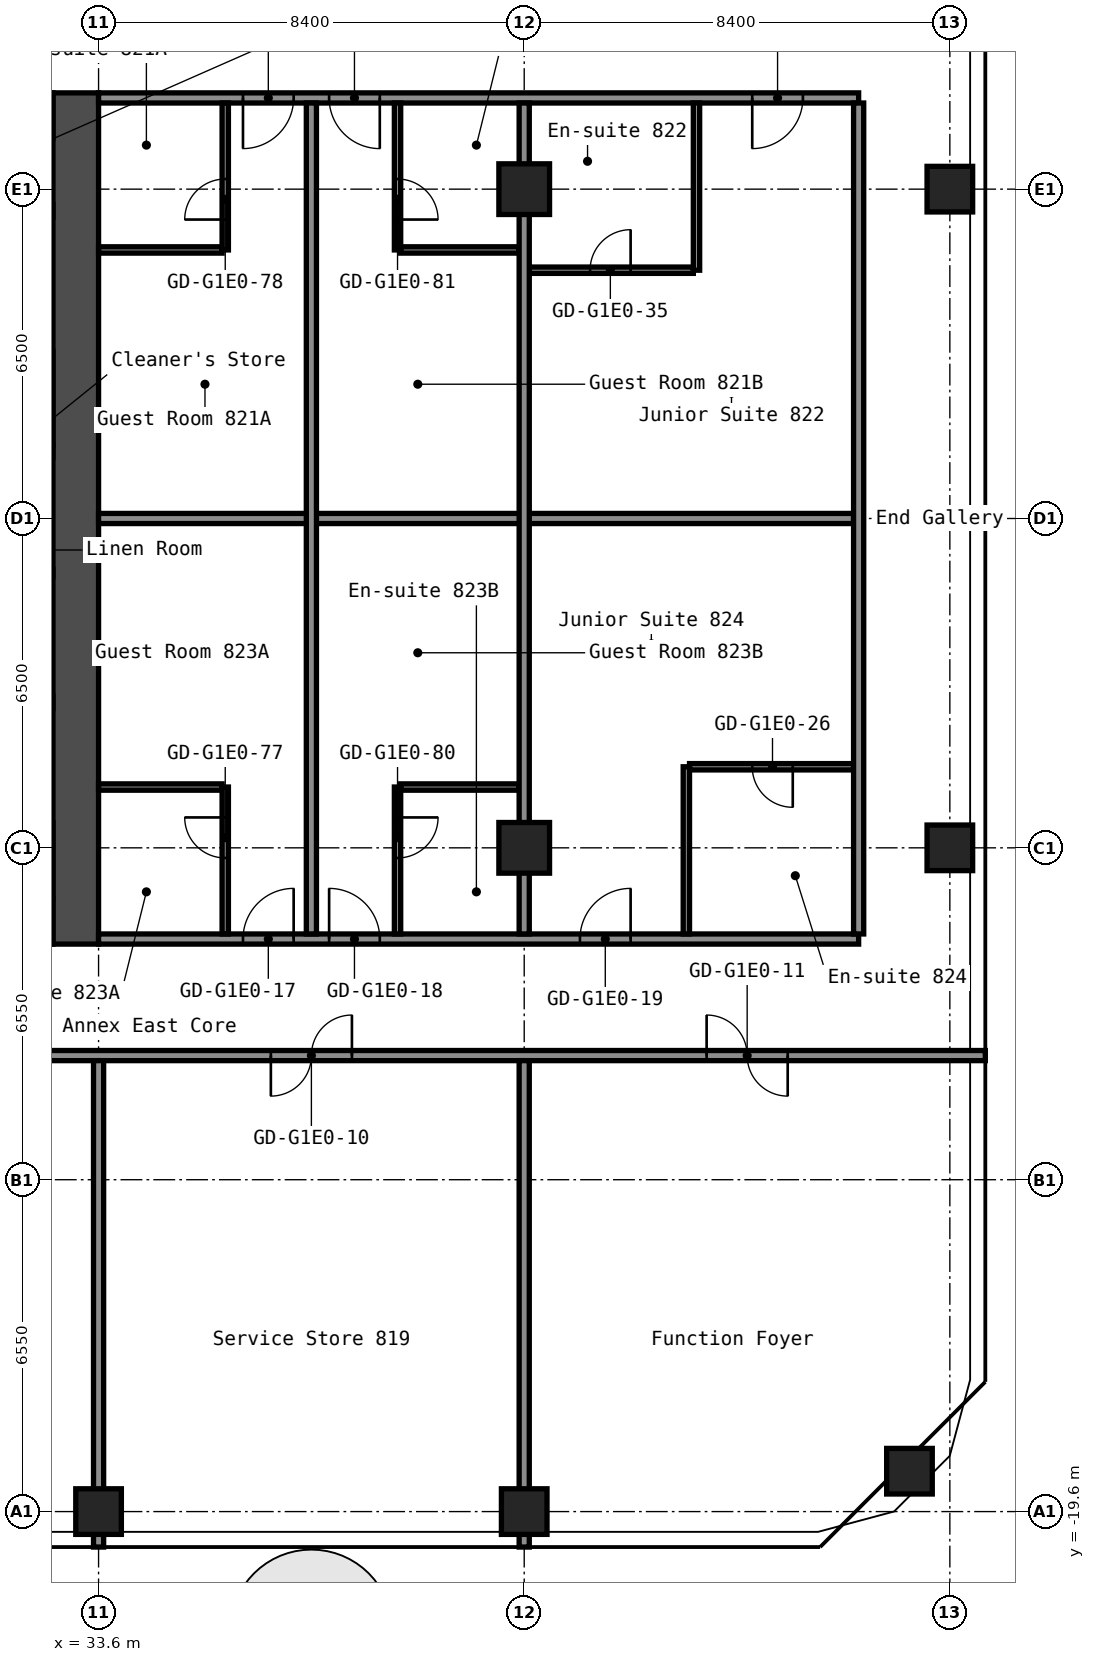
"""IFC4 building model, lengths in metres.
Left out: names, types, materials, properties, quantities, classifications, styles, units other than length and angle.
Written with IfcOpenShell. Run it as: python <this file> out.ifc"""

import sys

from ifc_helpers import new_model, si_unit, direction, frame, frame_2d, origin, origin_2d, place, context, subcontext, project, spatial, rectangle, hollow_rectangle, extrude, element, fill, save


model = new_model("IFC4")
c1 = context("Model", 3, precision=1e-05, world=origin(), true_north=direction((0.0, 1.0)))
c2 = subcontext(c1, "Body", "Model", "MODEL_VIEW")
j1 = project(units=[si_unit("LENGTHUNIT", "METRE"), si_unit("PLANEANGLEUNIT", "RADIAN")], contexts=[c1])
p1 = place(None, origin())
s1 = spatial("IfcSite", under=j1, at=p1, CompositionType="ELEMENT")
p2 = place(p1, origin())
s2 = spatial("IfcBuilding", under=s1, at=p2, CompositionType="ELEMENT")
p3 = place(p2, frame((0.0, 0.0, 32.6)))
s3 = spatial("IfcBuildingStorey", under=s2, at=p3, CompositionType="ELEMENT", Elevation=32.6)
for number, where, z_axis, x_axis in (
    (1, (33.6, -19.6, 0.0), (0.0, 0.0, 1.0), (1.0, 0.0, 0.0)),
    (2, (42.0, -19.6, 0.0), (0.0, 0.0, 1.0), (1.0, 0.0, 0.0)),
):
    element("IfcColumn", number, at=place(p3, frame(where, z_axis=z_axis, x_axis=x_axis)), inside=s3, PredefinedType="COLUMN", context=c2, shape_type="SweptSolid", body=[
        extrude(hollow_rectangle(XDim=0.9, YDim=0.9, WallThickness=0.036, at=origin_2d()), origin(), (0.0, 0.0, 1.0), 2.8),
    ])
for number, where, z_axis, x_axis in (
    (3, (42.0, -6.5, 0.0), (0.0, 0.0, 1.0), (1.0, 0.0, 0.0)),
    (4, (42.0, 6.5, 0.0), (0.0, 0.0, 1.0), (1.0, 0.0, 0.0)),
):
    element("IfcColumn", number, at=place(p3, frame(where, z_axis=z_axis, x_axis=x_axis)), inside=s3, PredefinedType="COLUMN", context=c2, shape_type="SweptSolid", body=[
        extrude(hollow_rectangle(XDim=1.0, YDim=1.0, WallThickness=0.04, at=origin_2d()), origin(), (0.0, 0.0, 1.0), 2.8),
    ])
for number, where, z_axis, x_axis in (
    (5, (49.603, -18.803, 0.0), (0.0, 0.0, 1.0), (1.0, 0.0, 0.0)),
    (6, (50.4, -6.5, 0.0), (0.0, 0.0, 1.0), (1.0, 0.0, 0.0)),
    (7, (50.4, 6.5, 0.0), (0.0, 0.0, 1.0), (1.0, 0.0, 0.0)),
):
    element("IfcColumn", number, at=place(p3, frame(where, z_axis=z_axis, x_axis=x_axis)), inside=s3, PredefinedType="COLUMN", context=c2, shape_type="SweptSolid", body=[
        extrude(hollow_rectangle(XDim=0.9, YDim=0.9, WallThickness=0.036, at=origin_2d()), origin(), (0.0, 0.0, 1.0), 2.8),
    ])
p4 = place(p3, frame((33.15, -8.4, 0.0), z_axis=(0.0, 0.0, 1.0), x_axis=(0.0, 1.0, 0.0)))
e8 = element("IfcWall", 8, at=p4, inside=s3, PredefinedType="SHEAR", context=c2, shape_type="SweptSolid", body=[
    extrude(rectangle(XDim=16.8, YDim=0.9, at=frame_2d((8.4, 0.0))), origin(), (0.0, 0.0, 1.0), 2.8),
])
p5 = place(p3, frame((16.8, -10.6, 0.0), z_axis=(0.0, 0.0, 1.0), x_axis=(1.0, 0.0, 0.0)))
e9 = element("IfcWall", 9, at=p5, inside=s3, PredefinedType="PARTITIONING", context=c2, shape_type="SweptSolid", body=[
    extrude(rectangle(XDim=34.3, YDim=0.2, at=frame_2d((17.15, 0.0))), origin(), (0.0, 0.0, 1.0), 2.8),
])
p6 = place(p5, frame((3.4, 0.0, 0.0)))
e10 = element("IfcOpeningElement", 10, at=p6, cuts=e9, PredefinedType="OPENING", context=c2, shape_type="SweptSolid", body=[
    extrude(rectangle(XDim=1.6, YDim=2.1, at=frame_2d((0.8, 1.05))), frame((0.0, 0.11, 0.0), z_axis=(0.0, -1.0, 0.0), x_axis=(1.0, 0.0, 0.0)), (0.0, 0.0, 1.0), 0.22),
])
p7 = place(p5, frame((11.8, 0.0, 0.0)))
e11 = element("IfcOpeningElement", 11, at=p7, cuts=e9, PredefinedType="OPENING", context=c2, shape_type="SweptSolid", body=[
    extrude(rectangle(XDim=1.6, YDim=2.1, at=frame_2d((0.8, 1.05))), frame((0.0, 0.11, 0.0), z_axis=(0.0, -1.0, 0.0), x_axis=(1.0, 0.0, 0.0)), (0.0, 0.0, 1.0), 0.22),
])
p8 = place(p5, frame((20.2, 0.0, 0.0)))
e12 = element("IfcOpeningElement", 12, at=p8, cuts=e9, PredefinedType="OPENING", context=c2, shape_type="SweptSolid", body=[
    extrude(rectangle(XDim=1.6, YDim=2.1, at=frame_2d((0.8, 1.05))), frame((0.0, 0.11, 0.0), z_axis=(0.0, -1.0, 0.0), x_axis=(1.0, 0.0, 0.0)), (0.0, 0.0, 1.0), 0.22),
])
p9 = place(p5, frame((28.8, 0.0, 0.0)))
e13 = element("IfcOpeningElement", 13, at=p9, cuts=e9, PredefinedType="OPENING", context=c2, shape_type="SweptSolid", body=[
    extrude(rectangle(XDim=1.6, YDim=2.1, at=frame_2d((0.8, 1.05))), frame((0.0, 0.11, 0.0), z_axis=(0.0, -1.0, 0.0), x_axis=(1.0, 0.0, 0.0)), (0.0, 0.0, 1.0), 0.22),
])
p10 = place(p3, frame((33.6, -8.3, 0.0), z_axis=(0.0, 0.0, 1.0), x_axis=(1.0, 0.0, 0.0)))
e14 = element("IfcWall", 14, at=p10, inside=s3, PredefinedType="PARTITIONING", context=c2, shape_type="SweptSolid", body=[
    extrude(rectangle(XDim=15.0, YDim=0.2, at=frame_2d((7.5, 0.0))), origin(), (0.0, 0.0, 1.0), 2.8),
])
p11 = place(p10, frame((2.85, 0.0, 0.0)))
e15 = element("IfcOpeningElement", 15, at=p11, cuts=e14, PredefinedType="OPENING", context=c2, shape_type="SweptSolid", body=[
    extrude(rectangle(XDim=1.0, YDim=2.1, at=frame_2d((0.5, 1.05))), frame((0.0, 0.11, 0.0), z_axis=(0.0, -1.0, 0.0), x_axis=(1.0, 0.0, 0.0)), (0.0, 0.0, 1.0), 0.22),
])
p12 = place(p10, frame((4.55, 0.0, 0.0)))
e16 = element("IfcOpeningElement", 16, at=p12, cuts=e14, PredefinedType="OPENING", context=c2, shape_type="SweptSolid", body=[
    extrude(rectangle(XDim=1.0, YDim=2.1, at=frame_2d((0.5, 1.05))), frame((0.0, 0.11, 0.0), z_axis=(0.0, -1.0, 0.0), x_axis=(1.0, 0.0, 0.0)), (0.0, 0.0, 1.0), 0.22),
])
p13 = place(p10, frame((9.5, 0.0, 0.0)))
e17 = element("IfcOpeningElement", 17, at=p13, cuts=e14, PredefinedType="OPENING", context=c2, shape_type="SweptSolid", body=[
    extrude(rectangle(XDim=1.0, YDim=2.1, at=frame_2d((0.5, 1.05))), frame((0.0, 0.11, 0.0), z_axis=(0.0, -1.0, 0.0), x_axis=(1.0, 0.0, 0.0)), (0.0, 0.0, 1.0), 0.22),
])
p14 = place(p3, frame((33.6, -5.3, 0.0), z_axis=(0.0, 0.0, 1.0), x_axis=(1.0, 0.0, 0.0)))
e18 = element("IfcWall", 18, at=p14, inside=s3, PredefinedType="PARTITIONING", context=c2, shape_type="SweptSolid", body=[
    extrude(rectangle(XDim=2.438, YDim=0.125, at=frame_2d((1.219, 0.0))), origin(), (0.0, 0.0, 1.0), 2.8),
])
p15 = place(p3, frame((39.562, -5.3, 0.0), z_axis=(0.0, 0.0, 1.0), x_axis=(1.0, 0.0, 0.0)))
e19 = element("IfcWall", 19, at=p15, inside=s3, PredefinedType="PARTITIONING", context=c2, shape_type="SweptSolid", body=[
    extrude(rectangle(XDim=2.337, YDim=0.125, at=frame_2d((1.169, 0.0))), origin(), (0.0, 0.0, 1.0), 2.8),
])
p16 = place(p3, frame((45.262, -4.9, 0.0), z_axis=(0.0, 0.0, 1.0), x_axis=(1.0, 0.0, 0.0)))
e20 = element("IfcWall", 20, at=p16, inside=s3, PredefinedType="PARTITIONING", context=c2, shape_type="SweptSolid", body=[
    extrude(rectangle(XDim=3.238, YDim=0.125, at=frame_2d((1.619, 0.0))), origin(), (0.0, 0.0, 1.0), 2.8),
])
p17 = place(p16, frame((1.238, 0.0, 0.0)))
e21 = element("IfcOpeningElement", 21, at=p17, cuts=e20, PredefinedType="OPENING", context=c2, shape_type="SweptSolid", body=[
    extrude(rectangle(XDim=0.8, YDim=2.1, at=frame_2d((0.4, 1.05))), frame((0.0, 0.073, 0.0), z_axis=(0.0, -1.0, 0.0), x_axis=(1.0, 0.0, 0.0)), (0.0, 0.0, 1.0), 0.145),
])
p18 = place(p3, frame((33.6, 0.0, 0.0), z_axis=(0.0, 0.0, 1.0), x_axis=(1.0, 0.0, 0.0)))
e22 = element("IfcWall", 22, at=p18, inside=s3, PredefinedType="PARTITIONING", context=c2, shape_type="SweptSolid", body=[
    extrude(rectangle(XDim=14.9, YDim=0.2, at=frame_2d((7.45, 0.0))), origin(), (0.0, 0.0, 1.0), 2.8),
])
p19 = place(p3, frame((42.1, 4.9, 0.0), z_axis=(0.0, 0.0, 1.0), x_axis=(1.0, 0.0, 0.0)))
e23 = element("IfcWall", 23, at=p19, inside=s3, PredefinedType="PARTITIONING", context=c2, shape_type="SweptSolid", body=[
    extrude(rectangle(XDim=3.237, YDim=0.125, at=frame_2d((1.619, 0.0))), origin(), (0.0, 0.0, 1.0), 2.8),
])
p20 = place(p19, frame((1.2, 0.0, 0.0)))
e24 = element("IfcOpeningElement", 24, at=p20, cuts=e23, PredefinedType="OPENING", context=c2, shape_type="SweptSolid", body=[
    extrude(rectangle(XDim=0.8, YDim=2.1, at=frame_2d((0.4, 1.05))), frame((0.0, 0.073, 0.0), z_axis=(0.0, -1.0, 0.0), x_axis=(1.0, 0.0, 0.0)), (0.0, 0.0, 1.0), 0.145),
])
p21 = place(p3, frame((33.6, 5.3, 0.0), z_axis=(0.0, 0.0, 1.0), x_axis=(1.0, 0.0, 0.0)))
e25 = element("IfcWall", 25, at=p21, inside=s3, PredefinedType="PARTITIONING", context=c2, shape_type="SweptSolid", body=[
    extrude(rectangle(XDim=2.438, YDim=0.125, at=frame_2d((1.219, 0.0))), origin(), (0.0, 0.0, 1.0), 2.8),
])
p22 = place(p3, frame((39.562, 5.3, 0.0), z_axis=(0.0, 0.0, 1.0), x_axis=(1.0, 0.0, 0.0)))
e26 = element("IfcWall", 26, at=p22, inside=s3, PredefinedType="PARTITIONING", context=c2, shape_type="SweptSolid", body=[
    extrude(rectangle(XDim=2.337, YDim=0.125, at=frame_2d((1.169, 0.0))), origin(), (0.0, 0.0, 1.0), 2.8),
])
p23 = place(p3, frame((33.6, 8.3, 0.0), z_axis=(0.0, 0.0, 1.0), x_axis=(1.0, 0.0, 0.0)))
e27 = element("IfcWall", 27, at=p23, inside=s3, PredefinedType="PARTITIONING", context=c2, shape_type="SweptSolid", body=[
    extrude(rectangle(XDim=15.0, YDim=0.2, at=frame_2d((7.5, 0.0))), origin(), (0.0, 0.0, 1.0), 2.8),
])
p24 = place(p23, frame((2.85, 0.0, 0.0)))
e28 = element("IfcOpeningElement", 28, at=p24, cuts=e27, PredefinedType="OPENING", context=c2, shape_type="SweptSolid", body=[
    extrude(rectangle(XDim=1.0, YDim=2.1, at=frame_2d((0.5, 1.05))), frame((0.0, 0.11, 0.0), z_axis=(0.0, -1.0, 0.0), x_axis=(1.0, 0.0, 0.0)), (0.0, 0.0, 1.0), 0.22),
])
p25 = place(p23, frame((4.55, 0.0, 0.0)))
e29 = element("IfcOpeningElement", 29, at=p25, cuts=e27, PredefinedType="OPENING", context=c2, shape_type="SweptSolid", body=[
    extrude(rectangle(XDim=1.0, YDim=2.1, at=frame_2d((0.5, 1.05))), frame((0.0, 0.11, 0.0), z_axis=(0.0, -1.0, 0.0), x_axis=(1.0, 0.0, 0.0)), (0.0, 0.0, 1.0), 0.22),
])
p26 = place(p23, frame((12.9, 0.0, 0.0)))
e30 = element("IfcOpeningElement", 30, at=p26, cuts=e27, PredefinedType="OPENING", context=c2, shape_type="SweptSolid", body=[
    extrude(rectangle(XDim=1.0, YDim=2.1, at=frame_2d((0.5, 1.05))), frame((0.0, 0.11, 0.0), z_axis=(0.0, -1.0, 0.0), x_axis=(1.0, 0.0, 0.0)), (0.0, 0.0, 1.0), 0.22),
])
p27 = place(p3, frame((33.6, -20.3, 0.0), z_axis=(0.0, 0.0, 1.0), x_axis=(0.0, 1.0, 0.0)))
e31 = element("IfcWall", 31, at=p27, inside=s3, PredefinedType="PARTITIONING", context=c2, shape_type="SweptSolid", body=[
    extrude(rectangle(XDim=9.6, YDim=0.2, at=frame_2d((4.8, 0.0))), origin(), (0.0, 0.0, 1.0), 2.8),
])
p28 = place(p3, frame((36.1, -8.2, 0.0), z_axis=(0.0, 0.0, 1.0), x_axis=(0.0, 1.0, 0.0)))
e32 = element("IfcWall", 32, at=p28, inside=s3, PredefinedType="PARTITIONING", context=c2, shape_type="SweptSolid", body=[
    extrude(rectangle(XDim=2.9, YDim=0.125, at=frame_2d((1.45, 0.0))), origin(), (0.0, 0.0, 1.0), 2.8),
])
p29 = place(p28, frame((1.5, 0.0, 0.0)))
e33 = element("IfcOpeningElement", 33, at=p29, cuts=e32, PredefinedType="OPENING", context=c2, shape_type="SweptSolid", body=[
    extrude(rectangle(XDim=0.8, YDim=2.1, at=frame_2d((0.4, 1.05))), frame((0.0, 0.073, 0.0), z_axis=(0.0, -1.0, 0.0), x_axis=(1.0, 0.0, 0.0)), (0.0, 0.0, 1.0), 0.145),
])
p30 = place(p3, frame((36.1, 5.3, 0.0), z_axis=(0.0, 0.0, 1.0), x_axis=(0.0, 1.0, 0.0)))
e34 = element("IfcWall", 34, at=p30, inside=s3, PredefinedType="PARTITIONING", context=c2, shape_type="SweptSolid", body=[
    extrude(rectangle(XDim=2.9, YDim=0.125, at=frame_2d((1.45, 0.0))), origin(), (0.0, 0.0, 1.0), 2.8),
])
p31 = place(p30, frame((0.6, 0.0, 0.0)))
e35 = element("IfcOpeningElement", 35, at=p31, cuts=e34, PredefinedType="OPENING", context=c2, shape_type="SweptSolid", body=[
    extrude(rectangle(XDim=0.8, YDim=2.1, at=frame_2d((0.4, 1.05))), frame((0.0, 0.073, 0.0), z_axis=(0.0, -1.0, 0.0), x_axis=(1.0, 0.0, 0.0)), (0.0, 0.0, 1.0), 0.145),
])
p32 = place(p3, frame((37.8, -8.2, 0.0), z_axis=(0.0, 0.0, 1.0), x_axis=(0.0, 1.0, 0.0)))
e36 = element("IfcWall", 36, at=p32, inside=s3, PredefinedType="PARTITIONING", context=c2, shape_type="SweptSolid", body=[
    extrude(rectangle(XDim=16.4, YDim=0.2, at=frame_2d((8.2, 0.0))), origin(), (0.0, 0.0, 1.0), 2.8),
])
p33 = place(p3, frame((39.5, -8.2, 0.0), z_axis=(0.0, 0.0, 1.0), x_axis=(0.0, 1.0, 0.0)))
e37 = element("IfcWall", 37, at=p33, inside=s3, PredefinedType="PARTITIONING", context=c2, shape_type="SweptSolid", body=[
    extrude(rectangle(XDim=2.9, YDim=0.125, at=frame_2d((1.45, 0.0))), origin(), (0.0, 0.0, 1.0), 2.8),
])
p34 = place(p33, frame((1.5, 0.0, 0.0)))
e38 = element("IfcOpeningElement", 38, at=p34, cuts=e37, PredefinedType="OPENING", context=c2, shape_type="SweptSolid", body=[
    extrude(rectangle(XDim=0.8, YDim=2.1, at=frame_2d((0.4, 1.05))), frame((0.0, 0.073, 0.0), z_axis=(0.0, -1.0, 0.0), x_axis=(1.0, 0.0, 0.0)), (0.0, 0.0, 1.0), 0.145),
])
p35 = place(p3, frame((39.5, 5.3, 0.0), z_axis=(0.0, 0.0, 1.0), x_axis=(0.0, 1.0, 0.0)))
e39 = element("IfcWall", 39, at=p35, inside=s3, PredefinedType="PARTITIONING", context=c2, shape_type="SweptSolid", body=[
    extrude(rectangle(XDim=2.9, YDim=0.125, at=frame_2d((1.45, 0.0))), origin(), (0.0, 0.0, 1.0), 2.8),
])
p36 = place(p35, frame((0.6, 0.0, 0.0)))
e40 = element("IfcOpeningElement", 40, at=p36, cuts=e39, PredefinedType="OPENING", context=c2, shape_type="SweptSolid", body=[
    extrude(rectangle(XDim=0.8, YDim=2.1, at=frame_2d((0.4, 1.05))), frame((0.0, 0.073, 0.0), z_axis=(0.0, -1.0, 0.0), x_axis=(1.0, 0.0, 0.0)), (0.0, 0.0, 1.0), 0.145),
])
p37 = place(p3, frame((42.0, -20.3, 0.0), z_axis=(0.0, 0.0, 1.0), x_axis=(0.0, 1.0, 0.0)))
e41 = element("IfcWall", 41, at=p37, inside=s3, PredefinedType="PARTITIONING", context=c2, shape_type="SweptSolid", body=[
    extrude(rectangle(XDim=9.6, YDim=0.2, at=frame_2d((4.8, 0.0))), origin(), (0.0, 0.0, 1.0), 2.8),
])
p38 = place(p3, frame((42.0, -8.2, 0.0), z_axis=(0.0, 0.0, 1.0), x_axis=(0.0, 1.0, 0.0)))
e42 = element("IfcWall", 42, at=p38, inside=s3, PredefinedType="PARTITIONING", context=c2, shape_type="SweptSolid", body=[
    extrude(rectangle(XDim=16.4, YDim=0.2, at=frame_2d((8.2, 0.0))), origin(), (0.0, 0.0, 1.0), 2.8),
])
for number, where, z_axis, x_axis in (
    (43, (45.2, -8.2, 0.0), (0.0, 0.0, 1.0), (0.0, 1.0, 0.0)),
    (44, (45.4, 4.9, 0.0), (0.0, 0.0, 1.0), (0.0, 1.0, 0.0)),
):
    element("IfcWall", number, at=place(p3, frame(where, z_axis=z_axis, x_axis=x_axis)), inside=s3, PredefinedType="PARTITIONING", context=c2, shape_type="SweptSolid", body=[
        extrude(rectangle(XDim=3.3, YDim=0.125, at=frame_2d((1.65, 0.0))), origin(), (0.0, 0.0, 1.0), 2.8),
    ])
p39 = place(p3, frame((48.6, -8.2, 0.0), z_axis=(0.0, 0.0, 1.0), x_axis=(0.0, 1.0, 0.0)))
e45 = element("IfcWall", 45, at=p39, inside=s3, PredefinedType="PARTITIONING", context=c2, shape_type="SweptSolid", body=[
    extrude(rectangle(XDim=16.4, YDim=0.2, at=frame_2d((8.2, 0.0))), origin(), (0.0, 0.0, 1.0), 2.8),
])
p40 = place(p8, origin())
e46 = element("IfcDoor", 46, at=p40, inside=s3, OperationType="DOUBLE_DOOR_SINGLE_SWING", PredefinedType="DOOR", context=c2, shape_type="SweptSolid", body=[
    extrude(rectangle(XDim=1.6, YDim=2.1, at=frame_2d((0.8, 1.05))), frame((0.0, 0.025, 0.0), z_axis=(0.0, -1.0, 0.0), x_axis=(1.0, 0.0, 0.0)), (0.0, 0.0, 1.0), 0.05),
])
fill(e12, e46)
p41 = place(p9, origin())
e47 = element("IfcDoor", 47, at=p41, inside=s3, OperationType="DOUBLE_DOOR_SINGLE_SWING", PredefinedType="DOOR", context=c2, shape_type="SweptSolid", body=[
    extrude(rectangle(XDim=1.6, YDim=2.1, at=frame_2d((0.8, 1.05))), frame((0.0, 0.025, 0.0), z_axis=(0.0, -1.0, 0.0), x_axis=(1.0, 0.0, 0.0)), (0.0, 0.0, 1.0), 0.05),
])
fill(e13, e47)
p42 = place(p11, origin())
e48 = element("IfcDoor", 48, at=p42, inside=s3, OperationType="SINGLE_SWING_LEFT", PredefinedType="DOOR", context=c2, shape_type="SweptSolid", body=[
    extrude(rectangle(XDim=1.0, YDim=2.1, at=frame_2d((0.5, 1.05))), frame((0.0, 0.025, 0.0), z_axis=(0.0, -1.0, 0.0), x_axis=(1.0, 0.0, 0.0)), (0.0, 0.0, 1.0), 0.05),
])
fill(e15, e48)
p43 = place(p12, origin())
e49 = element("IfcDoor", 49, at=p43, inside=s3, OperationType="SINGLE_SWING_RIGHT", PredefinedType="DOOR", context=c2, shape_type="SweptSolid", body=[
    extrude(rectangle(XDim=1.0, YDim=2.1, at=frame_2d((0.5, 1.05))), frame((0.0, 0.025, 0.0), z_axis=(0.0, -1.0, 0.0), x_axis=(1.0, 0.0, 0.0)), (0.0, 0.0, 1.0), 0.05),
])
fill(e16, e49)
p44 = place(p13, origin())
e50 = element("IfcDoor", 50, at=p44, inside=s3, OperationType="SINGLE_SWING_LEFT", PredefinedType="DOOR", context=c2, shape_type="SweptSolid", body=[
    extrude(rectangle(XDim=1.0, YDim=2.1, at=frame_2d((0.5, 1.05))), frame((0.0, 0.025, 0.0), z_axis=(0.0, -1.0, 0.0), x_axis=(1.0, 0.0, 0.0)), (0.0, 0.0, 1.0), 0.05),
])
fill(e17, e50)
p45 = place(p17, origin())
e51 = element("IfcDoor", 51, at=p45, inside=s3, OperationType="SINGLE_SWING_RIGHT", PredefinedType="DOOR", context=c2, shape_type="SweptSolid", body=[
    extrude(rectangle(XDim=0.8, YDim=2.1, at=frame_2d((0.4, 1.05))), frame((0.0, 0.025, 0.0), z_axis=(0.0, -1.0, 0.0), x_axis=(1.0, 0.0, 0.0)), (0.0, 0.0, 1.0), 0.05),
])
fill(e21, e51)
p46 = place(p20, origin())
e52 = element("IfcDoor", 52, at=p46, inside=s3, OperationType="SINGLE_SWING_LEFT", PredefinedType="DOOR", context=c2, shape_type="SweptSolid", body=[
    extrude(rectangle(XDim=0.8, YDim=2.1, at=frame_2d((0.4, 1.05))), frame((0.0, 0.025, 0.0), z_axis=(0.0, -1.0, 0.0), x_axis=(1.0, 0.0, 0.0)), (0.0, 0.0, 1.0), 0.05),
])
fill(e24, e52)
p47 = place(p24, origin())
e53 = element("IfcDoor", 53, at=p47, inside=s3, OperationType="SINGLE_SWING_LEFT", PredefinedType="DOOR", context=c2, shape_type="SweptSolid", body=[
    extrude(rectangle(XDim=1.0, YDim=2.1, at=frame_2d((0.5, 1.05))), frame((0.0, 0.025, 0.0), z_axis=(0.0, -1.0, 0.0), x_axis=(1.0, 0.0, 0.0)), (0.0, 0.0, 1.0), 0.05),
])
fill(e28, e53)
p48 = place(p25, origin())
e54 = element("IfcDoor", 54, at=p48, inside=s3, OperationType="SINGLE_SWING_RIGHT", PredefinedType="DOOR", context=c2, shape_type="SweptSolid", body=[
    extrude(rectangle(XDim=1.0, YDim=2.1, at=frame_2d((0.5, 1.05))), frame((0.0, 0.025, 0.0), z_axis=(0.0, -1.0, 0.0), x_axis=(1.0, 0.0, 0.0)), (0.0, 0.0, 1.0), 0.05),
])
fill(e29, e54)
p49 = place(p26, origin())
e55 = element("IfcDoor", 55, at=p49, inside=s3, OperationType="SINGLE_SWING_LEFT", PredefinedType="DOOR", context=c2, shape_type="SweptSolid", body=[
    extrude(rectangle(XDim=1.0, YDim=2.1, at=frame_2d((0.5, 1.05))), frame((0.0, 0.025, 0.0), z_axis=(0.0, -1.0, 0.0), x_axis=(1.0, 0.0, 0.0)), (0.0, 0.0, 1.0), 0.05),
])
fill(e30, e55)
p50 = place(p29, origin())
e56 = element("IfcDoor", 56, at=p50, inside=s3, OperationType="SINGLE_SWING_LEFT", PredefinedType="DOOR", context=c2, shape_type="SweptSolid", body=[
    extrude(rectangle(XDim=0.8, YDim=2.1, at=frame_2d((0.4, 1.05))), frame((0.0, 0.025, 0.0), z_axis=(0.0, -1.0, 0.0), x_axis=(1.0, 0.0, 0.0)), (0.0, 0.0, 1.0), 0.05),
])
fill(e33, e56)
p51 = place(p31, origin())
e57 = element("IfcDoor", 57, at=p51, inside=s3, OperationType="SINGLE_SWING_RIGHT", PredefinedType="DOOR", context=c2, shape_type="SweptSolid", body=[
    extrude(rectangle(XDim=0.8, YDim=2.1, at=frame_2d((0.4, 1.05))), frame((0.0, 0.025, 0.0), z_axis=(0.0, -1.0, 0.0), x_axis=(1.0, 0.0, 0.0)), (0.0, 0.0, 1.0), 0.05),
])
fill(e35, e57)
p52 = place(p34, origin())
e58 = element("IfcDoor", 58, at=p52, inside=s3, OperationType="SINGLE_SWING_RIGHT", PredefinedType="DOOR", context=c2, shape_type="SweptSolid", body=[
    extrude(rectangle(XDim=0.8, YDim=2.1, at=frame_2d((0.4, 1.05))), frame((0.0, 0.025, 0.0), z_axis=(0.0, -1.0, 0.0), x_axis=(1.0, 0.0, 0.0)), (0.0, 0.0, 1.0), 0.05),
])
fill(e38, e58)
p53 = place(p36, origin())
e59 = element("IfcDoor", 59, at=p53, inside=s3, OperationType="SINGLE_SWING_LEFT", PredefinedType="DOOR", context=c2, shape_type="SweptSolid", body=[
    extrude(rectangle(XDim=0.8, YDim=2.1, at=frame_2d((0.4, 1.05))), frame((0.0, 0.025, 0.0), z_axis=(0.0, -1.0, 0.0), x_axis=(1.0, 0.0, 0.0)), (0.0, 0.0, 1.0), 0.05),
])
fill(e40, e59)
save(model, sys.argv[1])
